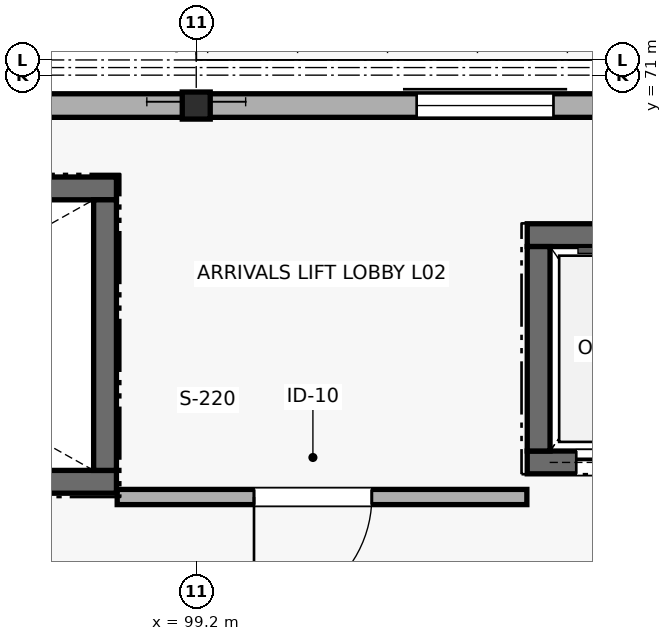
"""IFC4 building model, lengths in metres.
Left out: names, types, materials, properties, quantities, classifications, styles, units other than length and angle.
Written with IfcOpenShell. Run it as: python <this file> out.ifc"""

import sys

from ifc_helpers import new_model, si_unit, direction, frame, frame_2d, origin, origin_2d, place, context, subcontext, project, spatial, rectangle, i_section, extrude, element, fill, save


model = new_model("IFC4")
c1 = context("Model", 3, precision=1e-05, world=origin(), true_north=direction((0.0, 1.0)))
c2 = subcontext(c1, "Body", "Model", "MODEL_VIEW")
j1 = project(units=[si_unit("LENGTHUNIT", "METRE"), si_unit("PLANEANGLEUNIT", "RADIAN")], contexts=[c1])
p1 = place(None, origin())
s1 = spatial("IfcSite", under=j1, at=p1, CompositionType="ELEMENT")
p2 = place(p1, origin())
s2 = spatial("IfcBuilding", under=s1, at=p2, CompositionType="ELEMENT")
p3 = place(p2, frame((0.0, 0.0, 9.9)))
s3 = spatial("IfcBuildingStorey", under=s2, at=p3, CompositionType="ELEMENT", Elevation=9.9)
p4 = place(p3, frame((99.2, 70.6, 0.0), z_axis=(0.0, 0.0, 1.0), x_axis=(1.0, 0.0, 0.0)))
e1 = element("IfcColumn", 1, at=p4, inside=s3, PredefinedType="COLUMN", context=c2, shape_type="SweptSolid", body=[
    extrude(i_section(OverallWidth=0.368, OverallDepth=0.356, WebThickness=0.011, FlangeThickness=0.018, at=origin_2d()), origin(), (0.0, 0.0, 1.0), 4.2),
])
p5 = place(p3, frame((99.196, 70.6, 0.0), z_axis=(0.0, 0.0, 1.0), x_axis=(-1.0, 0.0, 0.0)))
e2 = element("IfcWall", 2, at=p5, inside=s3, PredefinedType="SOLIDWALL", context=c2, shape_type="SweptSolid", body=[
    extrude(rectangle(XDim=10.593, YDim=0.31, at=frame_2d((5.296, 0.0))), origin(), (0.0, 0.0, 1.0), 3.302),
])
p6 = place(p5, frame((2.596, 0.0, 1.05)))
e3 = element("IfcOpeningElement", 3, at=p6, cuts=e2, PredefinedType="OPENING", context=c2, shape_type="SweptSolid", body=[
    extrude(rectangle(XDim=1.8, YDim=1.8, at=frame_2d((0.9, 0.9))), frame((0.0, 0.165, 0.0), z_axis=(0.0, -1.0, 0.0), x_axis=(1.0, 0.0, 0.0)), (0.0, 0.0, 1.0), 0.33),
])
p7 = place(p5, frame((6.296, 0.0, 1.05)))
e4 = element("IfcOpeningElement", 4, at=p7, cuts=e2, PredefinedType="OPENING", context=c2, shape_type="SweptSolid", body=[
    extrude(rectangle(XDim=1.8, YDim=1.8, at=frame_2d((0.9, 0.9))), frame((0.0, 0.165, 0.0), z_axis=(0.0, -1.0, 0.0), x_axis=(1.0, 0.0, 0.0)), (0.0, 0.0, 1.0), 0.33),
])
p8 = place(p3, frame((110.196, 70.6, 0.0), z_axis=(0.0, 0.0, 1.0), x_axis=(-1.0, 0.0, 0.0)))
e5 = element("IfcWall", 5, at=p8, inside=s3, PredefinedType="SOLIDWALL", context=c2, shape_type="SweptSolid", body=[
    extrude(rectangle(XDim=10.993, YDim=0.31, at=frame_2d((5.496, 0.0))), origin(), (0.0, 0.0, 1.0), 3.302),
])
p9 = place(p8, frame((2.596, 0.0, 1.05)))
e6 = element("IfcOpeningElement", 6, at=p9, cuts=e5, PredefinedType="OPENING", context=c2, shape_type="SweptSolid", body=[
    extrude(rectangle(XDim=1.8, YDim=1.8, at=frame_2d((0.9, 0.9))), frame((0.0, 0.165, 0.0), z_axis=(0.0, -1.0, 0.0), x_axis=(1.0, 0.0, 0.0)), (0.0, 0.0, 1.0), 0.33),
])
p10 = place(p8, frame((6.296, 0.0, 1.05)))
e7 = element("IfcOpeningElement", 7, at=p10, cuts=e5, PredefinedType="OPENING", context=c2, shape_type="SweptSolid", body=[
    extrude(rectangle(XDim=1.8, YDim=1.8, at=frame_2d((0.9, 0.9))), frame((0.0, 0.165, 0.0), z_axis=(0.0, -1.0, 0.0), x_axis=(1.0, 0.0, 0.0)), (0.0, 0.0, 1.0), 0.33),
])
p11 = place(p3, frame((89.5, 65.65, 0.0), z_axis=(0.0, 0.0, 1.0), x_axis=(1.0, 0.0, 0.0)))
e8 = element("IfcWall", 8, at=p11, inside=s3, PredefinedType="SHEAR", context=c2, shape_type="SweptSolid", body=[
    extrude(rectangle(XDim=8.65, YDim=0.3, at=frame_2d((4.325, 0.0))), origin(), (0.0, 0.0, 1.0), 3.99),
])
p12 = place(p11, frame((0.35, 0.0, 0.0)))
e9 = element("IfcOpeningElement", 9, at=p12, cuts=e8, PredefinedType="OPENING", context=c2, shape_type="SweptSolid", body=[
    extrude(rectangle(XDim=1.35, YDim=2.2, at=frame_2d((0.675, 1.1))), frame((0.0, 0.16, 0.0), z_axis=(0.0, -1.0, 0.0), x_axis=(1.0, 0.0, 0.0)), (0.0, 0.0, 1.0), 0.32),
])
p13 = place(p3, frame((98.15, 69.51, 0.0), z_axis=(0.0, 0.0, 1.0), x_axis=(-1.0, 0.0, 0.0)))
e10 = element("IfcWall", 10, at=p13, inside=s3, PredefinedType="SHEAR", context=c2, shape_type="SweptSolid", body=[
    extrude(rectangle(XDim=8.65, YDim=0.3, at=frame_2d((4.325, 0.0))), origin(), (0.0, 0.0, 1.0), 3.99),
])
p14 = place(p3, frame((98.0, 65.8, 0.0), z_axis=(0.0, 0.0, 1.0), x_axis=(0.0, 1.0, 0.0)))
e11 = element("IfcWall", 11, at=p14, inside=s3, PredefinedType="SHEAR", context=c2, shape_type="SweptSolid", body=[
    extrude(rectangle(XDim=3.56, YDim=0.3, at=frame_2d((1.78, 0.0))), origin(), (0.0, 0.0, 1.0), 3.99),
])
p15 = place(p3, frame((103.555, 65.905, 0.0), z_axis=(0.0, 0.0, 1.0), x_axis=(1.0, 0.0, 0.0)))
e12 = element("IfcWall", 12, at=p15, inside=s3, PredefinedType="SHEAR", context=c2, shape_type="SweptSolid", body=[
    extrude(rectangle(XDim=2.49, YDim=0.3, at=frame_2d((1.245, 0.0))), origin(), (0.0, 0.0, 1.0), 3.99),
])
p16 = place(p15, frame((0.645, 0.0, 0.0)))
e13 = element("IfcOpeningElement", 13, at=p16, cuts=e12, PredefinedType="OPENING", context=c2, shape_type="SweptSolid", body=[
    extrude(rectangle(XDim=1.2, YDim=2.15, at=frame_2d((0.6, 1.075))), frame((0.0, 0.16, 0.0), z_axis=(0.0, -1.0, 0.0), x_axis=(1.0, 0.0, 0.0)), (0.0, 0.0, 1.0), 0.32),
])
p17 = place(p3, frame((106.045, 68.895, 0.0), z_axis=(0.0, 0.0, 1.0), x_axis=(-1.0, 0.0, 0.0)))
e14 = element("IfcWall", 14, at=p17, inside=s3, PredefinedType="SHEAR", context=c2, shape_type="SweptSolid", body=[
    extrude(rectangle(XDim=2.49, YDim=0.3, at=frame_2d((1.245, 0.0))), origin(), (0.0, 0.0, 1.0), 3.99),
])
p18 = place(p3, frame((103.705, 68.745, 0.0), z_axis=(0.0, 0.0, 1.0), x_axis=(0.0, -1.0, 0.0)))
e15 = element("IfcWall", 15, at=p18, inside=s3, PredefinedType="SHEAR", context=c2, shape_type="SweptSolid", body=[
    extrude(rectangle(XDim=2.69, YDim=0.3, at=frame_2d((1.345, 0.0))), origin(), (0.0, 0.0, 1.0), 3.99),
])
p19 = place(p3, frame((98.16, 65.45, 0.0), z_axis=(0.0, 0.0, 1.0), x_axis=(1.0, 0.0, 0.0)))
e16 = element("IfcWall", 16, at=p19, inside=s3, PredefinedType="PARTITIONING", context=c2, shape_type="SweptSolid", body=[
    extrude(rectangle(XDim=5.39, YDim=0.2, at=frame_2d((2.695, 0.0))), origin(), (0.0, 0.0, 1.0), 3.99),
])
p20 = place(p19, frame((1.8, 0.0, 0.0)))
e17 = element("IfcOpeningElement", 17, at=p20, cuts=e16, PredefinedType="OPENING", context=c2, shape_type="SweptSolid", body=[
    extrude(rectangle(XDim=1.55, YDim=2.3, at=frame_2d((0.775, 1.15))), frame((0.0, 0.11, 0.0), z_axis=(0.0, -1.0, 0.0), x_axis=(1.0, 0.0, 0.0)), (0.0, 0.0, 1.0), 0.22),
])
p21 = place(p10, origin())
e18 = element("IfcWindow", 18, at=p21, inside=s3, PartitioningType="SINGLE_PANEL", PredefinedType="WINDOW", context=c2, shape_type="SweptSolid", body=[
    extrude(rectangle(XDim=1.8, YDim=1.8, at=frame_2d((0.9, 0.9))), frame((0.0, 0.03, 0.0), z_axis=(0.0, -1.0, 0.0), x_axis=(1.0, 0.0, 0.0)), (0.0, 0.0, 1.0), 0.06),
])
fill(e7, e18)
p22 = place(p16, frame((1.2, 0.0, 0.0), z_axis=(0.0, 0.0, 1.0), x_axis=(-1.0, 0.0, 0.0)))
e19 = element("IfcDoor", 19, at=p22, inside=s3, OperationType="DOUBLE_DOOR_SLIDING", PredefinedType="DOOR", context=c2, shape_type="SweptSolid", body=[
    extrude(rectangle(XDim=1.2, YDim=2.15, at=frame_2d((0.6, 1.075))), frame((0.0, 0.025, 0.0), z_axis=(0.0, -1.0, 0.0), x_axis=(1.0, 0.0, 0.0)), (0.0, 0.0, 1.0), 0.05),
])
fill(e13, e19)
p23 = place(p20, frame((1.55, 0.0, 0.0), z_axis=(0.0, 0.0, 1.0), x_axis=(-1.0, 0.0, 0.0)))
e20 = element("IfcDoor", 20, at=p23, inside=s3, OperationType="SINGLE_SWING_RIGHT", PredefinedType="DOOR", context=c2, shape_type="SweptSolid", body=[
    extrude(rectangle(XDim=1.55, YDim=2.3, at=frame_2d((0.775, 1.15))), frame((0.0, 0.025, 0.0), z_axis=(0.0, -1.0, 0.0), x_axis=(1.0, 0.0, 0.0)), (0.0, 0.0, 1.0), 0.05),
])
fill(e17, e20)
save(model, sys.argv[1])
